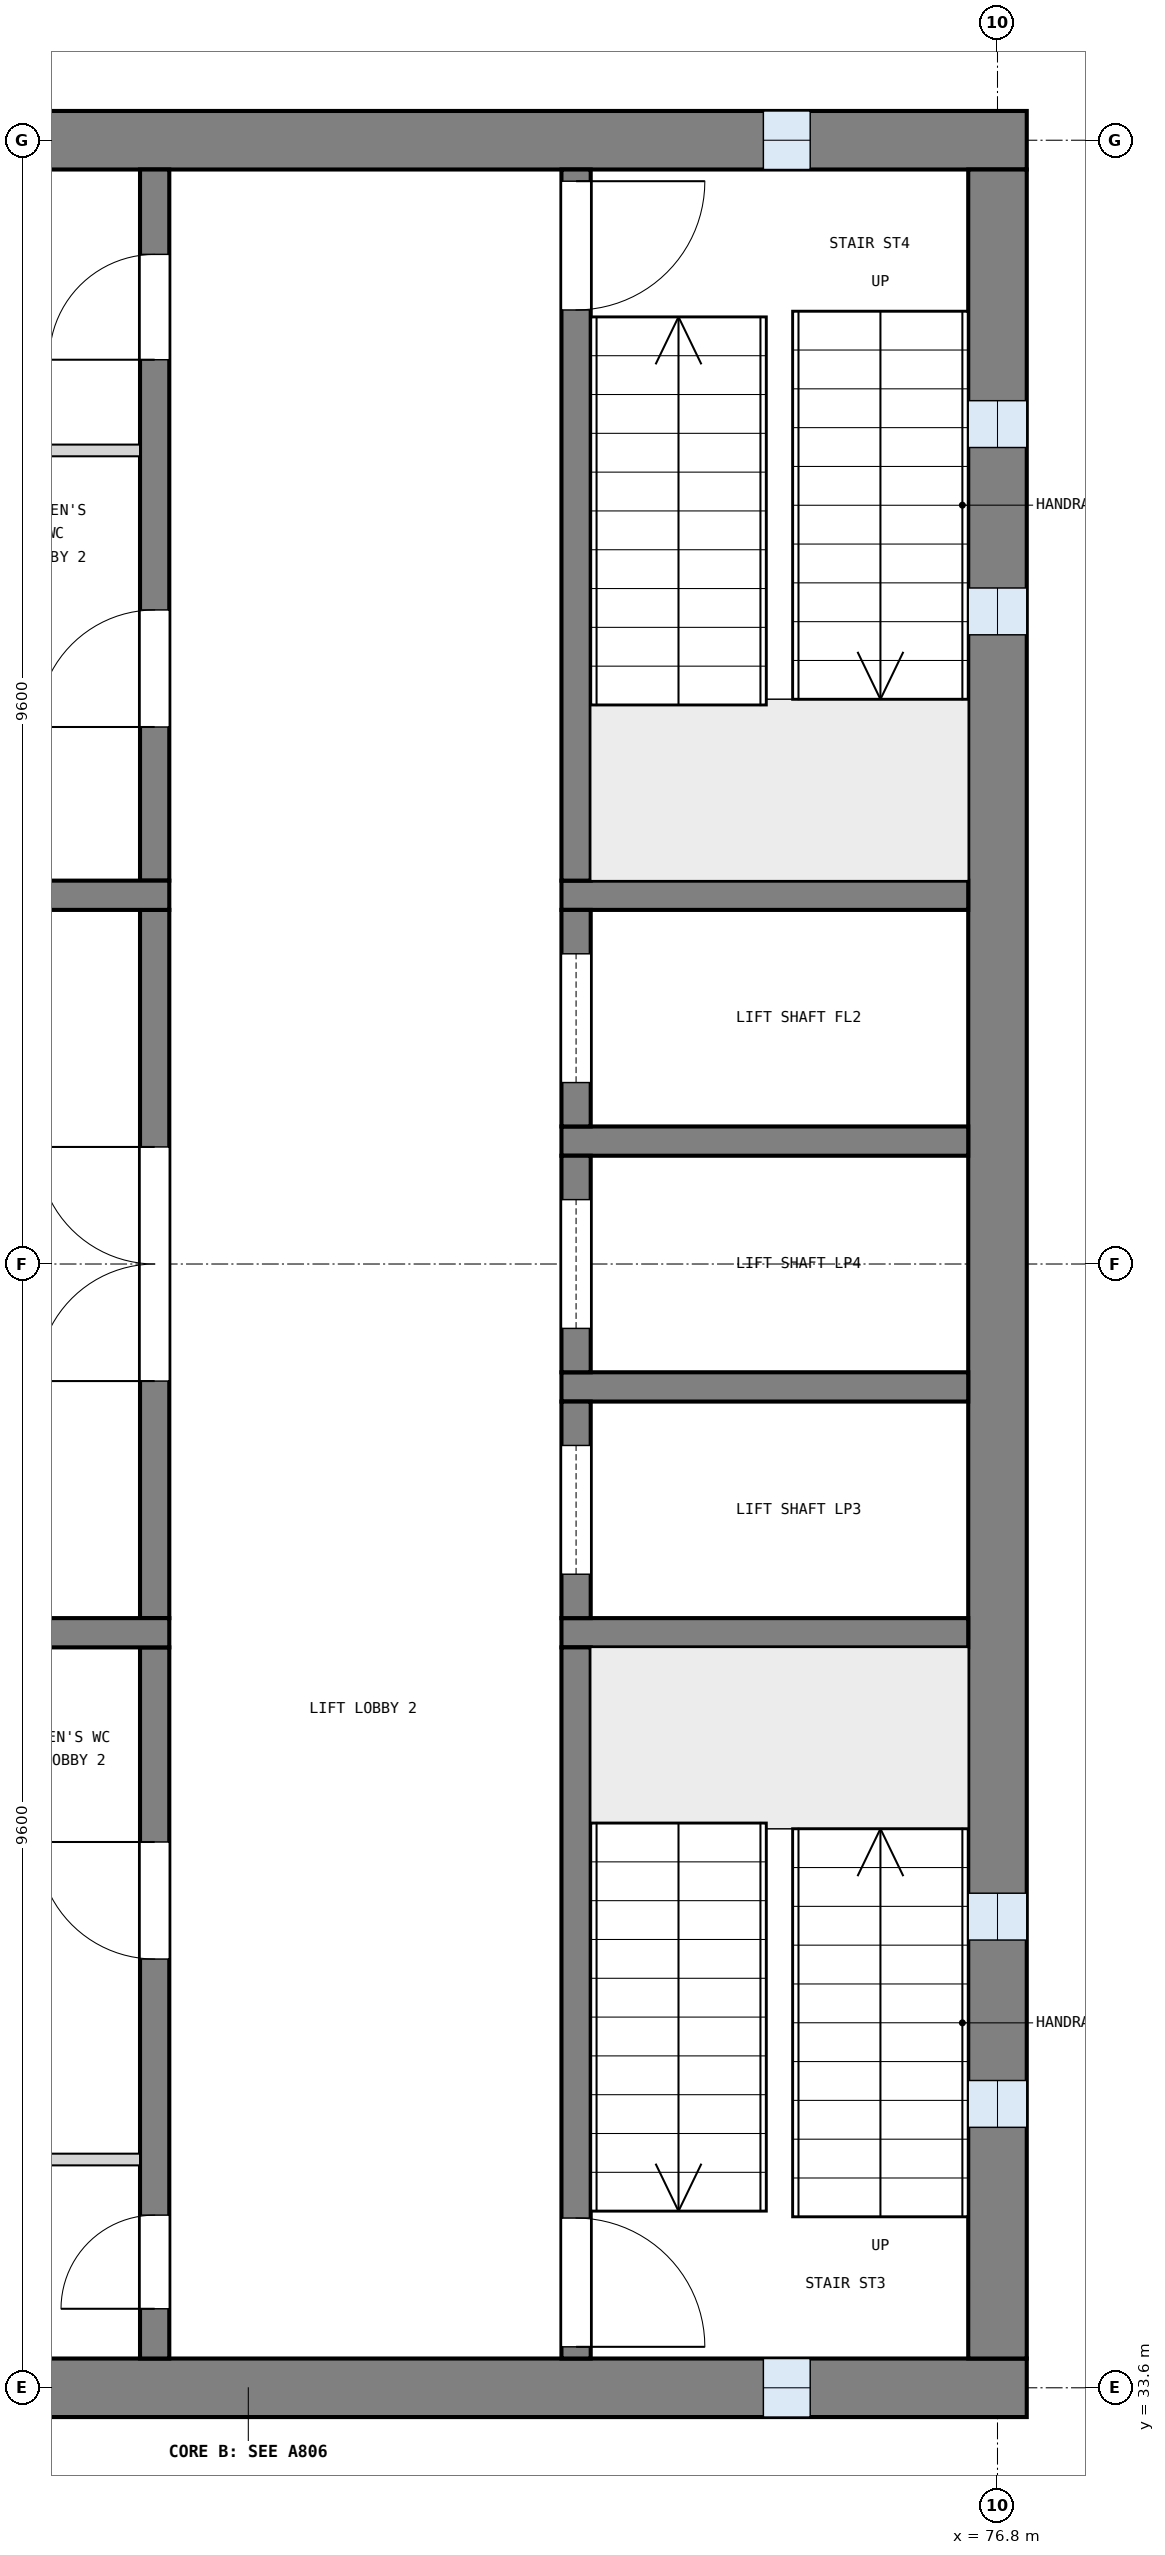
"""IFC4 building model, lengths in metres.
Left out: names, types, materials, properties, quantities, classifications, styles, units other than length and angle.
Written with IfcOpenShell. Run it as: python <this file> out.ifc"""

import sys

from ifc_helpers import new_model, si_unit, direction, frame, frame_2d, origin, place, context, subcontext, project, spatial, rectangle, extrude, element, fill, save


model = new_model("IFC4")
c1 = context("Model", 3, precision=1e-05, world=origin(), true_north=direction((0.0, 1.0)))
c2 = subcontext(c1, "Body", "Model", "MODEL_VIEW")
j1 = project(units=[si_unit("LENGTHUNIT", "METRE"), si_unit("PLANEANGLEUNIT", "RADIAN")], contexts=[c1])
p1 = place(None, origin())
s1 = spatial("IfcSite", under=j1, at=p1, CompositionType="ELEMENT")
p2 = place(p1, origin())
s2 = spatial("IfcBuilding", under=s1, at=p2, CompositionType="ELEMENT")
p3 = place(p2, frame((0.0, 0.0, 17.1)))
s3 = spatial("IfcBuildingStorey", under=s2, at=p3, CompositionType="ELEMENT", Elevation=17.1)
p4 = place(p3, frame((63.75, 52.8, 0.0), z_axis=(0.0, 0.0, 1.0), x_axis=(1.0, 0.0, 0.0)))
e1 = element("IfcWall", 1, at=p4, inside=s3, PredefinedType="SHEAR", context=c2, shape_type="SweptSolid", body=[
    extrude(rectangle(XDim=13.3, YDim=0.5, at=frame_2d((6.65, 0.0))), origin(), (0.0, 0.0, 1.0), 3.9),
])
p5 = place(p4, frame((11.05, 0.0, 1.0)))
e2 = element("IfcOpeningElement", 2, at=p5, cuts=e1, PredefinedType="OPENING", context=c2, shape_type="SweptSolid", body=[
    extrude(rectangle(XDim=0.4, YDim=2.0, at=frame_2d((0.2, 1.0))), frame((0.0, 0.26, 0.0), z_axis=(0.0, -1.0, 0.0), x_axis=(1.0, 0.0, 0.0)), (0.0, 0.0, 1.0), 0.52),
])
p6 = place(p3, frame((63.75, 33.6, 0.0), z_axis=(0.0, 0.0, 1.0), x_axis=(1.0, 0.0, 0.0)))
e3 = element("IfcWall", 3, at=p6, inside=s3, PredefinedType="SHEAR", context=c2, shape_type="SweptSolid", body=[
    extrude(rectangle(XDim=13.3, YDim=0.5, at=frame_2d((6.65, 0.0))), origin(), (0.0, 0.0, 1.0), 3.9),
])
p7 = place(p6, frame((11.05, 0.0, 1.0)))
e4 = element("IfcOpeningElement", 4, at=p7, cuts=e3, PredefinedType="OPENING", context=c2, shape_type="SweptSolid", body=[
    extrude(rectangle(XDim=0.4, YDim=2.0, at=frame_2d((0.2, 1.0))), frame((0.0, 0.26, 0.0), z_axis=(0.0, -1.0, 0.0), x_axis=(1.0, 0.0, 0.0)), (0.0, 0.0, 1.0), 0.52),
])
p8 = place(p3, frame((76.8, 33.85, 0.0), z_axis=(0.0, 0.0, 1.0), x_axis=(0.0, 1.0, 0.0)))
e5 = element("IfcWall", 5, at=p8, inside=s3, PredefinedType="SHEAR", context=c2, shape_type="SweptSolid", body=[
    extrude(rectangle(XDim=18.7, YDim=0.5, at=frame_2d((9.35, 0.0))), origin(), (0.0, 0.0, 1.0), 3.9),
])
p9 = place(p8, frame((1.975, 0.0, 1.0)))
e6 = element("IfcOpeningElement", 6, at=p9, cuts=e5, PredefinedType="OPENING", context=c2, shape_type="SweptSolid", body=[
    extrude(rectangle(XDim=0.4, YDim=2.0, at=frame_2d((0.2, 1.0))), frame((0.0, 0.26, 0.0), z_axis=(0.0, -1.0, 0.0), x_axis=(1.0, 0.0, 0.0)), (0.0, 0.0, 1.0), 0.52),
])
p10 = place(p8, frame((3.575, 0.0, 1.0)))
e7 = element("IfcOpeningElement", 7, at=p10, cuts=e5, PredefinedType="OPENING", context=c2, shape_type="SweptSolid", body=[
    extrude(rectangle(XDim=0.4, YDim=2.0, at=frame_2d((0.2, 1.0))), frame((0.0, 0.26, 0.0), z_axis=(0.0, -1.0, 0.0), x_axis=(1.0, 0.0, 0.0)), (0.0, 0.0, 1.0), 0.52),
])
p11 = place(p8, frame((14.725, 0.0, 1.0)))
e8 = element("IfcOpeningElement", 8, at=p11, cuts=e5, PredefinedType="OPENING", context=c2, shape_type="SweptSolid", body=[
    extrude(rectangle(XDim=0.4, YDim=2.0, at=frame_2d((0.2, 1.0))), frame((0.0, 0.26, 0.0), z_axis=(0.0, -1.0, 0.0), x_axis=(1.0, 0.0, 0.0)), (0.0, 0.0, 1.0), 0.52),
])
p12 = place(p8, frame((16.325, 0.0, 1.0)))
e9 = element("IfcOpeningElement", 9, at=p12, cuts=e5, PredefinedType="OPENING", context=c2, shape_type="SweptSolid", body=[
    extrude(rectangle(XDim=0.4, YDim=2.0, at=frame_2d((0.2, 1.0))), frame((0.0, 0.26, 0.0), z_axis=(0.0, -1.0, 0.0), x_axis=(1.0, 0.0, 0.0)), (0.0, 0.0, 1.0), 0.52),
])
for number, where, z_axis, x_axis in (
    (10, (76.55, 40.05, 0.0), (0.0, 0.0, 1.0), (-1.0, 0.0, 0.0)),
    (11, (76.55, 42.15, 0.0), (0.0, 0.0, 1.0), (-1.0, 0.0, 0.0)),
    (12, (76.55, 44.25, 0.0), (0.0, 0.0, 1.0), (-1.0, 0.0, 0.0)),
    (13, (76.55, 46.35, 0.0), (0.0, 0.0, 1.0), (-1.0, 0.0, 0.0)),
):
    element("IfcWall", number, at=place(p3, frame(where, z_axis=z_axis, x_axis=x_axis)), inside=s3, PredefinedType="SOLIDWALL", context=c2, shape_type="SweptSolid", body=[
        extrude(rectangle(XDim=3.475, YDim=0.25, at=frame_2d((1.738, 0.0))), origin(), (0.0, 0.0, 1.0), 3.6),
    ])
p13 = place(p3, frame((73.2, 33.85, 0.0), z_axis=(0.0, 0.0, 1.0), x_axis=(0.0, 1.0, 0.0)))
e14 = element("IfcWall", 14, at=p13, inside=s3, PredefinedType="SOLIDWALL", context=c2, shape_type="SweptSolid", body=[
    extrude(rectangle(XDim=6.075, YDim=0.25, at=frame_2d((3.038, 0.0))), origin(), (0.0, 0.0, 1.0), 3.6),
])
p14 = place(p13, frame((0.1, 0.0, 0.0)))
e15 = element("IfcOpeningElement", 15, at=p14, cuts=e14, PredefinedType="OPENING", context=c2, shape_type="SweptSolid", body=[
    extrude(rectangle(XDim=1.1, YDim=2.1, at=frame_2d((0.55, 1.05))), frame((0.0, 0.135, 0.0), z_axis=(0.0, -1.0, 0.0), x_axis=(1.0, 0.0, 0.0)), (0.0, 0.0, 1.0), 0.27),
])
p15 = place(p3, frame((73.2, 40.175, 0.0), z_axis=(0.0, 0.0, 1.0), x_axis=(0.0, 1.0, 0.0)))
e16 = element("IfcWall", 16, at=p15, inside=s3, PredefinedType="SOLIDWALL", context=c2, shape_type="SweptSolid", body=[
    extrude(rectangle(XDim=1.85, YDim=0.25, at=frame_2d((0.925, 0.0))), origin(), (0.0, 0.0, 1.0), 3.6),
])
p16 = place(p15, frame((0.375, 0.0, 0.0)))
e17 = element("IfcOpeningElement", 17, at=p16, cuts=e16, PredefinedType="OPENING", context=c2, shape_type="SweptSolid", body=[
    extrude(rectangle(XDim=1.1, YDim=2.1, at=frame_2d((0.55, 1.05))), frame((0.0, 0.135, 0.0), z_axis=(0.0, -1.0, 0.0), x_axis=(1.0, 0.0, 0.0)), (0.0, 0.0, 1.0), 0.27),
])
p17 = place(p3, frame((73.2, 42.275, 0.0), z_axis=(0.0, 0.0, 1.0), x_axis=(0.0, 1.0, 0.0)))
e18 = element("IfcWall", 18, at=p17, inside=s3, PredefinedType="SOLIDWALL", context=c2, shape_type="SweptSolid", body=[
    extrude(rectangle(XDim=1.85, YDim=0.25, at=frame_2d((0.925, 0.0))), origin(), (0.0, 0.0, 1.0), 3.6),
])
p18 = place(p17, frame((0.375, 0.0, 0.0)))
e19 = element("IfcOpeningElement", 19, at=p18, cuts=e18, PredefinedType="OPENING", context=c2, shape_type="SweptSolid", body=[
    extrude(rectangle(XDim=1.1, YDim=2.1, at=frame_2d((0.55, 1.05))), frame((0.0, 0.135, 0.0), z_axis=(0.0, -1.0, 0.0), x_axis=(1.0, 0.0, 0.0)), (0.0, 0.0, 1.0), 0.27),
])
p19 = place(p3, frame((73.2, 44.375, 0.0), z_axis=(0.0, 0.0, 1.0), x_axis=(0.0, 1.0, 0.0)))
e20 = element("IfcWall", 20, at=p19, inside=s3, PredefinedType="SOLIDWALL", context=c2, shape_type="SweptSolid", body=[
    extrude(rectangle(XDim=1.85, YDim=0.25, at=frame_2d((0.925, 0.0))), origin(), (0.0, 0.0, 1.0), 3.6),
])
p20 = place(p19, frame((0.375, 0.0, 0.0)))
e21 = element("IfcOpeningElement", 21, at=p20, cuts=e20, PredefinedType="OPENING", context=c2, shape_type="SweptSolid", body=[
    extrude(rectangle(XDim=1.1, YDim=2.1, at=frame_2d((0.55, 1.05))), frame((0.0, 0.135, 0.0), z_axis=(0.0, -1.0, 0.0), x_axis=(1.0, 0.0, 0.0)), (0.0, 0.0, 1.0), 0.27),
])
p21 = place(p3, frame((73.2, 46.475, 0.0), z_axis=(0.0, 0.0, 1.0), x_axis=(0.0, 1.0, 0.0)))
e22 = element("IfcWall", 22, at=p21, inside=s3, PredefinedType="SOLIDWALL", context=c2, shape_type="SweptSolid", body=[
    extrude(rectangle(XDim=6.075, YDim=0.25, at=frame_2d((3.038, 0.0))), origin(), (0.0, 0.0, 1.0), 3.6),
])
p22 = place(p21, frame((4.875, 0.0, 0.0)))
e23 = element("IfcOpeningElement", 23, at=p22, cuts=e22, PredefinedType="OPENING", context=c2, shape_type="SweptSolid", body=[
    extrude(rectangle(XDim=1.1, YDim=2.1, at=frame_2d((0.55, 1.05))), frame((0.0, 0.135, 0.0), z_axis=(0.0, -1.0, 0.0), x_axis=(1.0, 0.0, 0.0)), (0.0, 0.0, 1.0), 0.27),
])
p23 = place(p3, frame((69.6, 33.85, 0.0), z_axis=(0.0, 0.0, 1.0), x_axis=(0.0, 1.0, 0.0)))
e24 = element("IfcWall", 24, at=p23, inside=s3, PredefinedType="SOLIDWALL", context=c2, shape_type="SweptSolid", body=[
    extrude(rectangle(XDim=6.075, YDim=0.25, at=frame_2d((3.038, 0.0))), origin(), (0.0, 0.0, 1.0), 3.6),
])
p24 = place(p23, frame((0.425, 0.0, 0.0)))
e25 = element("IfcOpeningElement", 25, at=p24, cuts=e24, PredefinedType="OPENING", context=c2, shape_type="SweptSolid", body=[
    extrude(rectangle(XDim=0.8, YDim=2.1, at=frame_2d((0.4, 1.05))), frame((0.0, 0.135, 0.0), z_axis=(0.0, -1.0, 0.0), x_axis=(1.0, 0.0, 0.0)), (0.0, 0.0, 1.0), 0.27),
])
p25 = place(p23, frame((3.413, 0.0, 0.0)))
e26 = element("IfcOpeningElement", 26, at=p25, cuts=e24, PredefinedType="OPENING", context=c2, shape_type="SweptSolid", body=[
    extrude(rectangle(XDim=1.0, YDim=2.1, at=frame_2d((0.5, 1.05))), frame((0.0, 0.135, 0.0), z_axis=(0.0, -1.0, 0.0), x_axis=(1.0, 0.0, 0.0)), (0.0, 0.0, 1.0), 0.27),
])
p26 = place(p3, frame((69.6, 40.175, 0.0), z_axis=(0.0, 0.0, 1.0), x_axis=(0.0, 1.0, 0.0)))
e27 = element("IfcWall", 27, at=p26, inside=s3, PredefinedType="SOLIDWALL", context=c2, shape_type="SweptSolid", body=[
    extrude(rectangle(XDim=6.05, YDim=0.25, at=frame_2d((3.025, 0.0))), origin(), (0.0, 0.0, 1.0), 3.6),
])
p27 = place(p26, frame((2.025, 0.0, 0.0)))
e28 = element("IfcOpeningElement", 28, at=p27, cuts=e27, PredefinedType="OPENING", context=c2, shape_type="SweptSolid", body=[
    extrude(rectangle(XDim=2.0, YDim=2.1, at=frame_2d((1.0, 1.05))), frame((0.0, 0.135, 0.0), z_axis=(0.0, -1.0, 0.0), x_axis=(1.0, 0.0, 0.0)), (0.0, 0.0, 1.0), 0.27),
])
p28 = place(p3, frame((69.6, 46.475, 0.0), z_axis=(0.0, 0.0, 1.0), x_axis=(0.0, 1.0, 0.0)))
e29 = element("IfcWall", 29, at=p28, inside=s3, PredefinedType="SOLIDWALL", context=c2, shape_type="SweptSolid", body=[
    extrude(rectangle(XDim=6.075, YDim=0.25, at=frame_2d((3.038, 0.0))), origin(), (0.0, 0.0, 1.0), 3.6),
])
p29 = place(p28, frame((1.312, 0.0, 0.0)))
e30 = element("IfcOpeningElement", 30, at=p29, cuts=e29, PredefinedType="OPENING", context=c2, shape_type="SweptSolid", body=[
    extrude(rectangle(XDim=1.0, YDim=2.1, at=frame_2d((0.5, 1.05))), frame((0.0, 0.135, 0.0), z_axis=(0.0, -1.0, 0.0), x_axis=(1.0, 0.0, 0.0)), (0.0, 0.0, 1.0), 0.27),
])
p30 = place(p28, frame((4.45, 0.0, 0.0)))
e31 = element("IfcOpeningElement", 31, at=p30, cuts=e29, PredefinedType="OPENING", context=c2, shape_type="SweptSolid", body=[
    extrude(rectangle(XDim=0.9, YDim=2.1, at=frame_2d((0.45, 1.05))), frame((0.0, 0.135, 0.0), z_axis=(0.0, -1.0, 0.0), x_axis=(1.0, 0.0, 0.0)), (0.0, 0.0, 1.0), 0.27),
])
for number, where, z_axis, x_axis in (
    (32, (69.725, 40.05, 0.0), (0.0, 0.0, 1.0), (-1.0, 0.0, 0.0)),
    (33, (69.725, 46.35, 0.0), (0.0, 0.0, 1.0), (-1.0, 0.0, 0.0)),
):
    element("IfcWall", number, at=place(p3, frame(where, z_axis=z_axis, x_axis=x_axis)), inside=s3, PredefinedType="SOLIDWALL", context=c2, shape_type="SweptSolid", body=[
        extrude(rectangle(XDim=5.475, YDim=0.25, at=frame_2d((2.738, 0.0))), origin(), (0.0, 0.0, 1.0), 3.6),
    ])
for number, where, z_axis, x_axis in (
    (34, (69.475, 35.55, 0.0), (0.0, 0.0, 1.0), (-1.0, 0.0, 0.0)),
    (35, (69.475, 50.15, 0.0), (0.0, 0.0, 1.0), (-1.0, 0.0, 0.0)),
):
    element("IfcWall", number, at=place(p3, frame(where, z_axis=z_axis, x_axis=x_axis)), inside=s3, PredefinedType="PARTITIONING", context=c2, shape_type="SweptSolid", body=[
        extrude(rectangle(XDim=5.225, YDim=0.1, at=frame_2d((2.613, 0.0))), origin(), (0.0, 0.0, 1.0), 3.6),
    ])
p31 = place(p9, origin())
e36 = element("IfcWindow", 36, at=p31, inside=s3, PartitioningType="SINGLE_PANEL", PredefinedType="WINDOW", context=c2, shape_type="SweptSolid", body=[
    extrude(rectangle(XDim=0.4, YDim=2.0, at=frame_2d((0.2, 1.0))), frame((0.0, 0.03, 0.0), z_axis=(0.0, -1.0, 0.0), x_axis=(1.0, 0.0, 0.0)), (0.0, 0.0, 1.0), 0.06),
])
fill(e6, e36)
p32 = place(p10, origin())
e37 = element("IfcWindow", 37, at=p32, inside=s3, PartitioningType="SINGLE_PANEL", PredefinedType="WINDOW", context=c2, shape_type="SweptSolid", body=[
    extrude(rectangle(XDim=0.4, YDim=2.0, at=frame_2d((0.2, 1.0))), frame((0.0, 0.03, 0.0), z_axis=(0.0, -1.0, 0.0), x_axis=(1.0, 0.0, 0.0)), (0.0, 0.0, 1.0), 0.06),
])
fill(e7, e37)
p33 = place(p11, origin())
e38 = element("IfcWindow", 38, at=p33, inside=s3, PartitioningType="SINGLE_PANEL", PredefinedType="WINDOW", context=c2, shape_type="SweptSolid", body=[
    extrude(rectangle(XDim=0.4, YDim=2.0, at=frame_2d((0.2, 1.0))), frame((0.0, 0.03, 0.0), z_axis=(0.0, -1.0, 0.0), x_axis=(1.0, 0.0, 0.0)), (0.0, 0.0, 1.0), 0.06),
])
fill(e8, e38)
p34 = place(p12, origin())
e39 = element("IfcWindow", 39, at=p34, inside=s3, PartitioningType="SINGLE_PANEL", PredefinedType="WINDOW", context=c2, shape_type="SweptSolid", body=[
    extrude(rectangle(XDim=0.4, YDim=2.0, at=frame_2d((0.2, 1.0))), frame((0.0, 0.03, 0.0), z_axis=(0.0, -1.0, 0.0), x_axis=(1.0, 0.0, 0.0)), (0.0, 0.0, 1.0), 0.06),
])
fill(e9, e39)
p35 = place(p7, origin())
e40 = element("IfcWindow", 40, at=p35, inside=s3, PartitioningType="SINGLE_PANEL", PredefinedType="WINDOW", context=c2, shape_type="SweptSolid", body=[
    extrude(rectangle(XDim=0.4, YDim=2.0, at=frame_2d((0.2, 1.0))), frame((0.0, 0.03, 0.0), z_axis=(0.0, -1.0, 0.0), x_axis=(1.0, 0.0, 0.0)), (0.0, 0.0, 1.0), 0.06),
])
fill(e4, e40)
p36 = place(p5, origin())
e41 = element("IfcWindow", 41, at=p36, inside=s3, PartitioningType="SINGLE_PANEL", PredefinedType="WINDOW", context=c2, shape_type="SweptSolid", body=[
    extrude(rectangle(XDim=0.4, YDim=2.0, at=frame_2d((0.2, 1.0))), frame((0.0, 0.03, 0.0), z_axis=(0.0, -1.0, 0.0), x_axis=(1.0, 0.0, 0.0)), (0.0, 0.0, 1.0), 0.06),
])
fill(e2, e41)
p37 = place(p14, frame((1.1, 0.0, 0.0), z_axis=(0.0, 0.0, 1.0), x_axis=(-1.0, 0.0, 0.0)))
e42 = element("IfcDoor", 42, at=p37, inside=s3, OperationType="SINGLE_SWING_RIGHT", PredefinedType="DOOR", context=c2, shape_type="SweptSolid", body=[
    extrude(rectangle(XDim=1.1, YDim=2.1, at=frame_2d((0.55, 1.05))), frame((0.0, 0.025, 0.0), z_axis=(0.0, -1.0, 0.0), x_axis=(1.0, 0.0, 0.0)), (0.0, 0.0, 1.0), 0.05),
])
fill(e15, e42)
p38 = place(p22, frame((1.1, 0.0, 0.0), z_axis=(0.0, 0.0, 1.0), x_axis=(-1.0, 0.0, 0.0)))
e43 = element("IfcDoor", 43, at=p38, inside=s3, OperationType="SINGLE_SWING_LEFT", PredefinedType="DOOR", context=c2, shape_type="SweptSolid", body=[
    extrude(rectangle(XDim=1.1, YDim=2.1, at=frame_2d((0.55, 1.05))), frame((0.0, 0.025, 0.0), z_axis=(0.0, -1.0, 0.0), x_axis=(1.0, 0.0, 0.0)), (0.0, 0.0, 1.0), 0.05),
])
fill(e23, e43)
p39 = place(p16, origin())
e44 = element("IfcDoor", 44, at=p39, inside=s3, OperationType="SLIDING_TO_LEFT", PredefinedType="DOOR", context=c2, shape_type="SweptSolid", body=[
    extrude(rectangle(XDim=1.1, YDim=2.1, at=frame_2d((0.55, 1.05))), frame((0.0, 0.025, 0.0), z_axis=(0.0, -1.0, 0.0), x_axis=(1.0, 0.0, 0.0)), (0.0, 0.0, 1.0), 0.05),
])
fill(e17, e44)
p40 = place(p18, origin())
e45 = element("IfcDoor", 45, at=p40, inside=s3, OperationType="SLIDING_TO_LEFT", PredefinedType="DOOR", context=c2, shape_type="SweptSolid", body=[
    extrude(rectangle(XDim=1.1, YDim=2.1, at=frame_2d((0.55, 1.05))), frame((0.0, 0.025, 0.0), z_axis=(0.0, -1.0, 0.0), x_axis=(1.0, 0.0, 0.0)), (0.0, 0.0, 1.0), 0.05),
])
fill(e19, e45)
p41 = place(p20, origin())
e46 = element("IfcDoor", 46, at=p41, inside=s3, OperationType="SLIDING_TO_LEFT", PredefinedType="DOOR", context=c2, shape_type="SweptSolid", body=[
    extrude(rectangle(XDim=1.1, YDim=2.1, at=frame_2d((0.55, 1.05))), frame((0.0, 0.025, 0.0), z_axis=(0.0, -1.0, 0.0), x_axis=(1.0, 0.0, 0.0)), (0.0, 0.0, 1.0), 0.05),
])
fill(e21, e46)
p42 = place(p27, origin())
e47 = element("IfcDoor", 47, at=p42, inside=s3, OperationType="DOUBLE_DOOR_SINGLE_SWING", PredefinedType="DOOR", context=c2, shape_type="SweptSolid", body=[
    extrude(rectangle(XDim=2.0, YDim=2.1, at=frame_2d((1.0, 1.05))), frame((0.0, 0.025, 0.0), z_axis=(0.0, -1.0, 0.0), x_axis=(1.0, 0.0, 0.0)), (0.0, 0.0, 1.0), 0.05),
])
fill(e28, e47)
p43 = place(p24, origin())
e48 = element("IfcDoor", 48, at=p43, inside=s3, OperationType="SINGLE_SWING_LEFT", PredefinedType="DOOR", context=c2, shape_type="SweptSolid", body=[
    extrude(rectangle(XDim=0.8, YDim=2.1, at=frame_2d((0.4, 1.05))), frame((0.0, 0.025, 0.0), z_axis=(0.0, -1.0, 0.0), x_axis=(1.0, 0.0, 0.0)), (0.0, 0.0, 1.0), 0.05),
])
fill(e25, e48)
p44 = place(p25, origin())
e49 = element("IfcDoor", 49, at=p44, inside=s3, OperationType="SINGLE_SWING_RIGHT", PredefinedType="DOOR", context=c2, shape_type="SweptSolid", body=[
    extrude(rectangle(XDim=1.0, YDim=2.1, at=frame_2d((0.5, 1.05))), frame((0.0, 0.025, 0.0), z_axis=(0.0, -1.0, 0.0), x_axis=(1.0, 0.0, 0.0)), (0.0, 0.0, 1.0), 0.05),
])
fill(e26, e49)
p45 = place(p29, origin())
e50 = element("IfcDoor", 50, at=p45, inside=s3, OperationType="SINGLE_SWING_LEFT", PredefinedType="DOOR", context=c2, shape_type="SweptSolid", body=[
    extrude(rectangle(XDim=1.0, YDim=2.1, at=frame_2d((0.5, 1.05))), frame((0.0, 0.025, 0.0), z_axis=(0.0, -1.0, 0.0), x_axis=(1.0, 0.0, 0.0)), (0.0, 0.0, 1.0), 0.05),
])
fill(e30, e50)
p46 = place(p30, origin())
e51 = element("IfcDoor", 51, at=p46, inside=s3, OperationType="SINGLE_SWING_LEFT", PredefinedType="DOOR", context=c2, shape_type="SweptSolid", body=[
    extrude(rectangle(XDim=0.9, YDim=2.1, at=frame_2d((0.45, 1.05))), frame((0.0, 0.025, 0.0), z_axis=(0.0, -1.0, 0.0), x_axis=(1.0, 0.0, 0.0)), (0.0, 0.0, 1.0), 0.05),
])
fill(e31, e51)
save(model, sys.argv[1])
